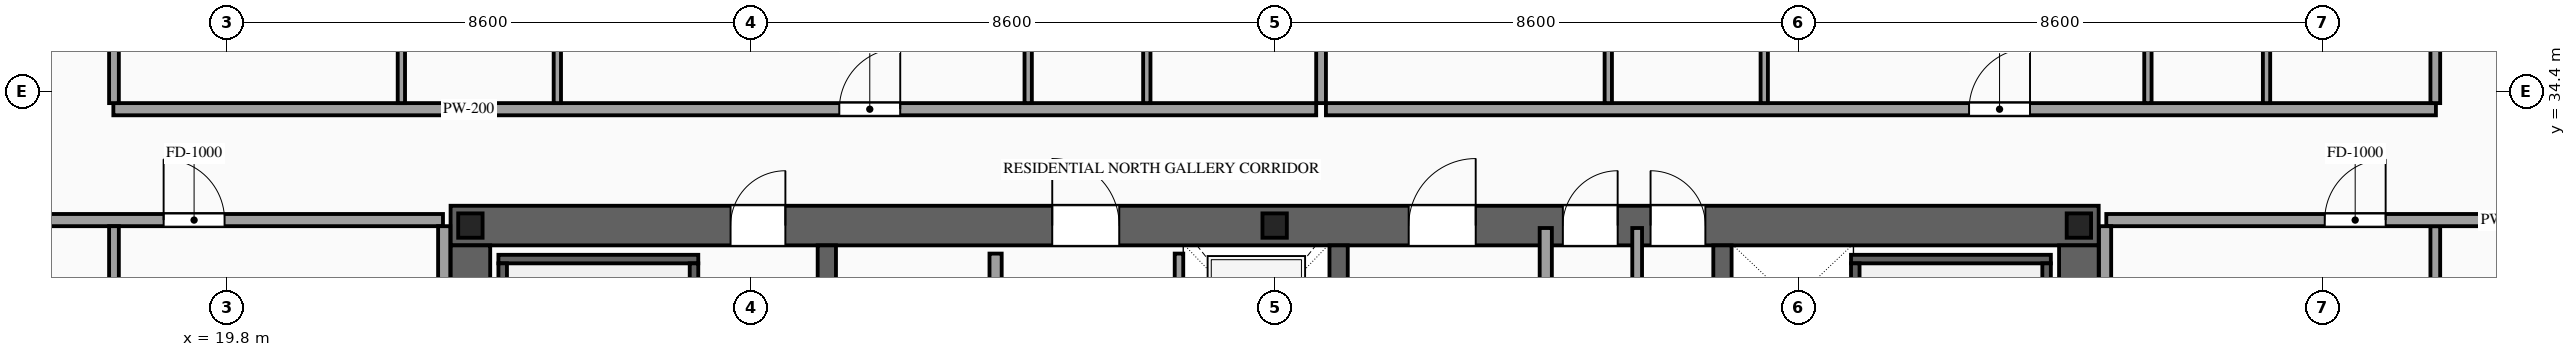
"""IFC4 building model, lengths in metres.
Left out: names, types, materials, properties, quantities, classifications, styles, units other than length and angle.
Written with IfcOpenShell. Run it as: python <this file> out.ifc"""

import sys

from ifc_helpers import new_model, si_unit, direction, frame, frame_2d, origin, origin_2d, place, context, subcontext, project, spatial, rectangle, i_section, extrude, source, transform, mapped, element, fill, save


model = new_model("IFC4")
c1 = context("Model", 3, precision=1e-05, world=origin(), true_north=direction((0.0, 1.0)))
c2 = subcontext(c1, "Body", "Model", "MODEL_VIEW")
j1 = project(units=[si_unit("LENGTHUNIT", "METRE"), si_unit("PLANEANGLEUNIT", "RADIAN")], contexts=[c1])
p1 = place(None, origin())
s1 = spatial("IfcSite", under=j1, at=p1, CompositionType="ELEMENT")
p2 = place(p1, origin())
s2 = spatial("IfcBuilding", under=s1, at=p2, CompositionType="ELEMENT")
p3 = place(p2, frame((0.0, 0.0, 198.5)))
s3 = spatial("IfcBuildingStorey", under=s2, at=p3, CompositionType="ELEMENT", Elevation=198.5)
p4 = place(p3, frame((23.475, 32.2, 0.0), z_axis=(0.0, 0.0, 1.0), x_axis=(1.0, 0.0, 0.0)))
e1 = element("IfcWall", 1, at=p4, inside=s3, PredefinedType="SHEAR", context=c2, shape_type="SweptSolid", body=[
    extrude(rectangle(XDim=27.05, YDim=0.65, at=frame_2d((13.525, 0.0))), origin(), (0.0, 0.0, 1.0), 3.5),
])
p5 = place(p4, frame((4.595, 0.0, 0.0)))
e2 = element("IfcOpeningElement", 2, at=p5, cuts=e1, PredefinedType="OPENING", context=c2, shape_type="SweptSolid", body=[
    extrude(rectangle(XDim=0.9, YDim=2.15, at=frame_2d((0.45, 1.075))), frame((0.0, 0.34, 0.0), z_axis=(0.0, -1.0, 0.0), x_axis=(1.0, 0.0, 0.0)), (0.0, 0.0, 1.0), 0.68),
])
p6 = place(p4, frame((9.875, 0.0, 0.0)))
e3 = element("IfcOpeningElement", 3, at=p6, cuts=e1, PredefinedType="OPENING", context=c2, shape_type="SweptSolid", body=[
    extrude(rectangle(XDim=1.1, YDim=2.2, at=frame_2d((0.55, 1.1))), frame((0.0, 0.34, 0.0), z_axis=(0.0, -1.0, 0.0), x_axis=(1.0, 0.0, 0.0)), (0.0, 0.0, 1.0), 0.68),
])
p7 = place(p4, frame((15.725, 0.0, 0.0)))
e4 = element("IfcOpeningElement", 4, at=p7, cuts=e1, PredefinedType="OPENING", context=c2, shape_type="SweptSolid", body=[
    extrude(rectangle(XDim=1.1, YDim=2.2, at=frame_2d((0.55, 1.1))), frame((0.0, 0.34, 0.0), z_axis=(0.0, -1.0, 0.0), x_axis=(1.0, 0.0, 0.0)), (0.0, 0.0, 1.0), 0.68),
])
p8 = place(p4, frame((18.255, 0.0, 0.0)))
e5 = element("IfcOpeningElement", 5, at=p8, cuts=e1, PredefinedType="OPENING", context=c2, shape_type="SweptSolid", body=[
    extrude(rectangle(XDim=0.9, YDim=2.15, at=frame_2d((0.45, 1.075))), frame((0.0, 0.34, 0.0), z_axis=(0.0, -1.0, 0.0), x_axis=(1.0, 0.0, 0.0)), (0.0, 0.0, 1.0), 0.68),
])
p9 = place(p4, frame((19.695, 0.0, 0.0)))
e6 = element("IfcOpeningElement", 6, at=p9, cuts=e1, PredefinedType="OPENING", context=c2, shape_type="SweptSolid", body=[
    extrude(rectangle(XDim=0.9, YDim=2.15, at=frame_2d((0.45, 1.075))), frame((0.0, 0.34, 0.0), z_axis=(0.0, -1.0, 0.0), x_axis=(1.0, 0.0, 0.0)), (0.0, 0.0, 1.0), 0.68),
])
m1 = source(origin(), c2, "Body", "SweptSolid", [
    extrude(rectangle(XDim=12.15, YDim=0.65, at=frame_2d((6.075, 0.0))), origin(), (0.0, 0.0, 1.0), 3.5),
])
for number, where, z_axis, x_axis in (
    (7, (23.8, 19.725, 0.0), (0.0, 0.0, 1.0), (0.0, 1.0, 0.0)),
    (8, (50.2, 19.725, 0.0), (0.0, 0.0, 1.0), (0.0, 1.0, 0.0)),
):
    element("IfcWall", number, at=place(p3, frame(where, z_axis=z_axis, x_axis=x_axis)), inside=s3, PredefinedType="SHEAR", context=c2, shape_type="MappedRepresentation", body=[
        mapped(m1, transform((0.0, 0.0, 0.0), scale=1.0)),
    ])
m2 = source(origin(), c2, "Body", "SweptSolid", [
    extrude(rectangle(XDim=12.15, YDim=0.3, at=frame_2d((6.075, 0.0))), origin(), (0.0, 0.0, 1.0), 3.5),
])
for number, where, z_axis, x_axis in (
    (9, (29.65, 19.725, 0.0), (0.0, 0.0, 1.0), (0.0, 1.0, 0.0)),
    (10, (38.05, 19.725, 0.0), (0.0, 0.0, 1.0), (0.0, 1.0, 0.0)),
    (11, (44.35, 19.725, 0.0), (0.0, 0.0, 1.0), (0.0, 1.0, 0.0)),
):
    element("IfcWall", number, at=place(p3, frame(where, z_axis=z_axis, x_axis=x_axis)), inside=s3, PredefinedType="SOLIDWALL", context=c2, shape_type="MappedRepresentation", body=[
        mapped(m2, transform((0.0, 0.0, 0.0), scale=1.0)),
    ])
m3 = source(origin(), c2, "Body", "SweptSolid", [
    extrude(i_section(OverallWidth=0.4, OverallDepth=0.4, WebThickness=0.013, FlangeThickness=0.021, at=origin_2d()), origin(), (0.0, 0.0, 1.0), 3.5),
])
for number, where, z_axis, x_axis in (
    (12, (23.8, 32.2, 0.0), (0.0, 0.0, 1.0), (1.0, 0.0, 0.0)),
    (13, (37.0, 32.2, 0.0), (0.0, 0.0, 1.0), (1.0, 0.0, 0.0)),
    (14, (50.2, 32.2, 0.0), (0.0, 0.0, 1.0), (1.0, 0.0, 0.0)),
):
    element("IfcColumn", number, at=place(p3, frame(where, z_axis=z_axis, x_axis=x_axis)), inside=s3, PredefinedType="COLUMN", context=c2, shape_type="MappedRepresentation", body=[
        mapped(m3, transform((0.0, 0.0, 0.0), scale=1.0)),
    ])
p10 = place(p3, frame((35.43, 29.4, 0.0), z_axis=(0.0, 0.0, 1.0), x_axis=(0.0, 1.0, 0.0)))
e15 = element("IfcWall", 15, at=p10, inside=s3, PredefinedType="SOLIDWALL", context=c2, shape_type="SweptSolid", body=[
    extrude(rectangle(XDim=2.34, YDim=0.14, at=frame_2d((1.17, 0.0))), origin(), (0.0, 0.0, 1.0), 3.28),
])
p11 = place(p10, frame((0.62, 0.0, 0.0)))
e16 = element("IfcOpeningElement", 16, at=p11, cuts=e15, PredefinedType="OPENING", context=c2, shape_type="SweptSolid", body=[
    extrude(rectangle(XDim=1.1, YDim=2.2, at=frame_2d((0.55, 1.1))), frame((0.0, 0.085, 0.0), z_axis=(0.0, -1.0, 0.0), x_axis=(1.0, 0.0, 0.0)), (0.0, 0.0, 1.0), 0.17),
])
m4 = source(origin(), c2, "Body", "SweptSolid", [
    extrude(rectangle(XDim=3.28, YDim=0.14, at=frame_2d((1.64, 0.0))), origin(), (0.0, 0.0, 1.0), 3.28),
])
p12 = place(p3, frame((24.26, 31.65, 0.0), z_axis=(0.0, 0.0, 1.0), x_axis=(1.0, 0.0, 0.0)))
e17 = element("IfcWall", 17, at=p12, inside=s3, PredefinedType="SOLIDWALL", context=c2, shape_type="MappedRepresentation", body=[
    mapped(m4, transform((0.0, 0.0, 0.0), scale=1.0)),
])
m5 = source(origin(), c2, "Body", "SweptSolid", [
    extrude(rectangle(XDim=8.94, YDim=0.14, at=frame_2d((4.47, 0.0))), origin(), (0.0, 0.0, 1.0), 3.28),
])
for number, where, z_axis, x_axis in (
    (18, (24.33, 22.64, 0.0), (0.0, 0.0, 1.0), (0.0, 1.0, 0.0)),
    (19, (27.47, 22.64, 0.0), (0.0, 0.0, 1.0), (0.0, 1.0, 0.0)),
):
    element("IfcWall", number, at=place(p3, frame(where, z_axis=z_axis, x_axis=x_axis)), inside=s3, PredefinedType="SOLIDWALL", context=c2, shape_type="MappedRepresentation", body=[
        mapped(m5, transform((0.0, 0.0, 0.0), scale=1.0)),
    ])
p13 = place(p3, frame((46.46, 31.65, 0.0), z_axis=(0.0, 0.0, 1.0), x_axis=(1.0, 0.0, 0.0)))
e20 = element("IfcWall", 20, at=p13, inside=s3, PredefinedType="SOLIDWALL", context=c2, shape_type="MappedRepresentation", body=[
    mapped(m4, transform((0.0, 0.0, 0.0), scale=1.0)),
])
for number, where, z_axis, x_axis in (
    (21, (46.53, 22.64, 0.0), (0.0, 0.0, 1.0), (0.0, 1.0, 0.0)),
    (22, (49.67, 22.64, 0.0), (0.0, 0.0, 1.0), (0.0, 1.0, 0.0)),
):
    element("IfcWall", number, at=place(p3, frame(where, z_axis=z_axis, x_axis=x_axis)), inside=s3, PredefinedType="SOLIDWALL", context=c2, shape_type="MappedRepresentation", body=[
        mapped(m5, transform((0.0, 0.0, 0.0), scale=1.0)),
    ])
p14 = place(p3, frame((32.42, 28.05, 0.0), z_axis=(0.0, 0.0, 1.0), x_axis=(0.0, 1.0, 0.0)))
e23 = element("IfcWall", 23, at=p14, inside=s3, PredefinedType="PARTITIONING", context=c2, shape_type="SweptSolid", body=[
    extrude(rectangle(XDim=3.69, YDim=0.2, at=frame_2d((1.845, 0.0))), origin(), (0.0, 0.0, 1.0), 3.28),
])
p15 = place(p14, frame((1.395, 0.0, 0.0)))
e24 = element("IfcOpeningElement", 24, at=p15, cuts=e23, PredefinedType="OPENING", context=c2, shape_type="SweptSolid", body=[
    extrude(rectangle(XDim=0.9, YDim=2.15, at=frame_2d((0.45, 1.075))), frame((0.0, 0.115, 0.0), z_axis=(0.0, -1.0, 0.0), x_axis=(1.0, 0.0, 0.0)), (0.0, 0.0, 1.0), 0.23),
])
m6 = source(origin(), c2, "Body", "SweptSolid", [
    extrude(rectangle(XDim=5.96, YDim=0.2, at=frame_2d((2.98, 0.0))), origin(), (0.0, 0.0, 1.0), 3.28),
])
p16 = place(p3, frame((41.45, 26.2, 0.0), z_axis=(0.0, 0.0, 1.0), x_axis=(0.0, 1.0, 0.0)))
e25 = element("IfcWall", 25, at=p16, inside=s3, PredefinedType="PARTITIONING", context=c2, shape_type="MappedRepresentation", body=[
    mapped(m6, transform((0.0, 0.0, 0.0), scale=1.0)),
])
m7 = source(origin(), c2, "Body", "SweptSolid", [
    extrude(rectangle(XDim=5.96, YDim=0.16, at=frame_2d((2.98, 0.0))), origin(), (0.0, 0.0, 1.0), 3.28),
])
p17 = place(p3, frame((42.95, 26.2, 0.0), z_axis=(0.0, 0.0, 1.0), x_axis=(0.0, 1.0, 0.0)))
e26 = element("IfcWall", 26, at=p17, inside=s3, PredefinedType="PARTITIONING", context=c2, shape_type="MappedRepresentation", body=[
    mapped(m7, transform((0.0, 0.0, 0.0), scale=1.0)),
])
p18 = place(p3, frame((17.94, 34.11, 0.0), z_axis=(0.0, 0.0, 1.0), x_axis=(1.0, 0.0, 0.0)))
e27 = element("IfcWall", 27, at=p18, inside=s3, PredefinedType="PARTITIONING", context=c2, shape_type="SweptSolid", body=[
    extrude(rectangle(XDim=19.742, YDim=0.2, at=frame_2d((9.871, 0.0))), origin(), (0.0, 0.0, 1.0), 3.28),
])
p19 = place(p18, frame((11.915, 0.0, 0.0)))
e28 = element("IfcOpeningElement", 28, at=p19, cuts=e27, PredefinedType="OPENING", context=c2, shape_type="SweptSolid", body=[
    extrude(rectangle(XDim=1.0, YDim=2.2, at=frame_2d((0.5, 1.1))), frame((0.0, 0.115, 0.0), z_axis=(0.0, -1.0, 0.0), x_axis=(1.0, 0.0, 0.0)), (0.0, 0.0, 1.0), 0.23),
])
m8 = source(origin(), c2, "Body", "SweptSolid", [
    extrude(rectangle(XDim=13.54, YDim=0.16, at=frame_2d((6.77, 0.0))), origin(), (0.0, 0.0, 1.0), 3.28),
])
p20 = place(p3, frame((37.762, 34.21, 0.0), z_axis=(0.0, 0.0, 1.0), x_axis=(0.0, 1.0, 0.0)))
e29 = element("IfcWall", 29, at=p20, inside=s3, PredefinedType="PARTITIONING", context=c2, shape_type="MappedRepresentation", body=[
    mapped(m8, transform((0.0, 0.0, 0.0), scale=1.0)),
])
m9 = source(origin(), c2, "Body", "SweptSolid", [
    extrude(rectangle(XDim=5.61, YDim=0.12, at=frame_2d((2.805, 0.0))), origin(), (0.0, 0.0, 1.0), 3.28),
])
p21 = place(p3, frame((22.667, 34.21, 0.0), z_axis=(0.0, 0.0, 1.0), x_axis=(0.0, 1.0, 0.0)))
e30 = element("IfcWall", 30, at=p21, inside=s3, PredefinedType="PARTITIONING", context=c2, shape_type="MappedRepresentation", body=[
    mapped(m9, transform((0.0, 0.0, 0.0), scale=1.0)),
])
p22 = place(p3, frame((25.227, 34.21, 0.0), z_axis=(0.0, 0.0, 1.0), x_axis=(0.0, 1.0, 0.0)))
e31 = element("IfcWall", 31, at=p22, inside=s3, PredefinedType="PARTITIONING", context=c2, shape_type="SweptSolid", body=[
    extrude(rectangle(XDim=5.61, YDim=0.12, at=frame_2d((2.805, 0.0))), origin(), (0.0, 0.0, 1.0), 3.28),
])
p23 = place(p22, frame((2.38, 0.0, 0.0)))
e32 = element("IfcOpeningElement", 32, at=p23, cuts=e31, PredefinedType="OPENING", context=c2, shape_type="SweptSolid", body=[
    extrude(rectangle(XDim=0.85, YDim=2.1, at=frame_2d((0.425, 1.05))), frame((0.0, 0.075, 0.0), z_axis=(0.0, -1.0, 0.0), x_axis=(1.0, 0.0, 0.0)), (0.0, 0.0, 1.0), 0.15),
])
for number, where, z_axis, x_axis in (
    (33, (34.902, 34.21, 0.0), (0.0, 0.0, 1.0), (0.0, 1.0, 0.0)),
    (34, (32.955, 34.21, 0.0), (0.0, 0.0, 1.0), (0.0, 1.0, 0.0)),
):
    element("IfcWall", number, at=place(p3, frame(where, z_axis=z_axis, x_axis=x_axis)), inside=s3, PredefinedType="PARTITIONING", context=c2, shape_type="MappedRepresentation", body=[
        mapped(m9, transform((0.0, 0.0, 0.0), scale=1.0)),
    ])
p24 = place(p3, frame((37.842, 34.11, 0.0), z_axis=(0.0, 0.0, 1.0), x_axis=(1.0, 0.0, 0.0)))
e35 = element("IfcWall", 35, at=p24, inside=s3, PredefinedType="PARTITIONING", context=c2, shape_type="SweptSolid", body=[
    extrude(rectangle(XDim=18.218, YDim=0.2, at=frame_2d((9.109, 0.0))), origin(), (0.0, 0.0, 1.0), 3.28),
])
p25 = place(p24, frame((10.556, 0.0, 0.0)))
e36 = element("IfcOpeningElement", 36, at=p25, cuts=e35, PredefinedType="OPENING", context=c2, shape_type="SweptSolid", body=[
    extrude(rectangle(XDim=1.0, YDim=2.2, at=frame_2d((0.5, 1.1))), frame((0.0, 0.115, 0.0), z_axis=(0.0, -1.0, 0.0), x_axis=(1.0, 0.0, 0.0)), (0.0, 0.0, 1.0), 0.23),
])
m10 = source(origin(), c2, "Body", "SweptSolid", [
    extrude(rectangle(XDim=13.39, YDim=0.16, at=frame_2d((6.695, 0.0))), origin(), (0.0, 0.0, 1.0), 3.28),
])
for number, where, z_axis, x_axis in (
    (37, (17.95, 34.21, 0.0), (0.0, 0.0, 1.0), (0.0, 1.0, 0.0)),
    (38, (56.05, 34.21, 0.0), (0.0, 0.0, 1.0), (0.0, 1.0, 0.0)),
):
    element("IfcWall", number, at=place(p3, frame(where, z_axis=z_axis, x_axis=x_axis)), inside=s3, PredefinedType="PARTITIONING", context=c2, shape_type="MappedRepresentation", body=[
        mapped(m10, transform((0.0, 0.0, 0.0), scale=1.0)),
    ])
p26 = place(p3, frame((42.476, 34.21, 0.0), z_axis=(0.0, 0.0, 1.0), x_axis=(0.0, 1.0, 0.0)))
e39 = element("IfcWall", 39, at=p26, inside=s3, PredefinedType="PARTITIONING", context=c2, shape_type="MappedRepresentation", body=[
    mapped(m9, transform((0.0, 0.0, 0.0), scale=1.0)),
])
p27 = place(p3, frame((45.036, 34.21, 0.0), z_axis=(0.0, 0.0, 1.0), x_axis=(0.0, 1.0, 0.0)))
e40 = element("IfcWall", 40, at=p27, inside=s3, PredefinedType="PARTITIONING", context=c2, shape_type="SweptSolid", body=[
    extrude(rectangle(XDim=5.61, YDim=0.12, at=frame_2d((2.805, 0.0))), origin(), (0.0, 0.0, 1.0), 3.28),
])
p28 = place(p27, frame((2.38, 0.0, 0.0)))
e41 = element("IfcOpeningElement", 41, at=p28, cuts=e40, PredefinedType="OPENING", context=c2, shape_type="SweptSolid", body=[
    extrude(rectangle(XDim=0.85, YDim=2.1, at=frame_2d((0.425, 1.05))), frame((0.0, 0.075, 0.0), z_axis=(0.0, -1.0, 0.0), x_axis=(1.0, 0.0, 0.0)), (0.0, 0.0, 1.0), 0.15),
])
for number, where, z_axis, x_axis in (
    (42, (53.28, 34.21, 0.0), (0.0, 0.0, 1.0), (0.0, 1.0, 0.0)),
    (43, (51.333, 34.21, 0.0), (0.0, 0.0, 1.0), (0.0, 1.0, 0.0)),
):
    element("IfcWall", number, at=place(p3, frame(where, z_axis=z_axis, x_axis=x_axis)), inside=s3, PredefinedType="PARTITIONING", context=c2, shape_type="MappedRepresentation", body=[
        mapped(m9, transform((0.0, 0.0, 0.0), scale=1.0)),
    ])
p29 = place(p3, frame((15.05, 32.29, 0.0), z_axis=(0.0, 0.0, 1.0), x_axis=(1.0, 0.0, 0.0)))
e44 = element("IfcWall", 44, at=p29, inside=s3, PredefinedType="PARTITIONING", context=c2, shape_type="SweptSolid", body=[
    extrude(rectangle(XDim=8.3, YDim=0.2, at=frame_2d((4.15, 0.0))), origin(), (0.0, 0.0, 1.0), 2.775),
])
p30 = place(p29, frame((3.715, 0.0, 0.0)))
e45 = element("IfcOpeningElement", 45, at=p30, cuts=e44, PredefinedType="OPENING", context=c2, shape_type="SweptSolid", body=[
    extrude(rectangle(XDim=1.0, YDim=2.2, at=frame_2d((0.5, 1.1))), frame((0.0, 0.115, 0.0), z_axis=(0.0, -1.0, 0.0), x_axis=(1.0, 0.0, 0.0)), (0.0, 0.0, 1.0), 0.23),
])
m11 = source(origin(), c2, "Body", "SweptSolid", [
    extrude(rectangle(XDim=28.19, YDim=0.16, at=frame_2d((14.095, 0.0))), origin(), (0.0, 0.0, 1.0), 3.28),
])
for number, where, z_axis, x_axis in (
    (46, (17.95, 4.0, 0.0), (0.0, 0.0, 1.0), (0.0, 1.0, 0.0)),
    (47, (56.05, 4.0, 0.0), (0.0, 0.0, 1.0), (0.0, 1.0, 0.0)),
):
    element("IfcWall", number, at=place(p3, frame(where, z_axis=z_axis, x_axis=x_axis)), inside=s3, PredefinedType="PARTITIONING", context=c2, shape_type="MappedRepresentation", body=[
        mapped(m11, transform((0.0, 0.0, 0.0), scale=1.0)),
    ])
m12 = source(origin(), c2, "Body", "SweptSolid", [
    extrude(rectangle(XDim=6.29, YDim=0.2, at=frame_2d((3.145, 0.0))), origin(), (0.0, 0.0, 1.0), 3.28),
])
p31 = place(p3, frame((23.37, 25.9, 0.0), z_axis=(0.0, 0.0, 1.0), x_axis=(0.0, 1.0, 0.0)))
e48 = element("IfcWall", 48, at=p31, inside=s3, PredefinedType="PARTITIONING", context=c2, shape_type="MappedRepresentation", body=[
    mapped(m12, transform((0.0, 0.0, 0.0), scale=1.0)),
])
p32 = place(p3, frame((50.65, 32.29, 0.0), z_axis=(0.0, 0.0, 1.0), x_axis=(1.0, 0.0, 0.0)))
e49 = element("IfcWall", 49, at=p32, inside=s3, PredefinedType="PARTITIONING", context=c2, shape_type="SweptSolid", body=[
    extrude(rectangle(XDim=8.3, YDim=0.2, at=frame_2d((4.15, 0.0))), origin(), (0.0, 0.0, 1.0), 2.775),
])
p33 = place(p32, frame((3.585, 0.0, 0.0)))
e50 = element("IfcOpeningElement", 50, at=p33, cuts=e49, PredefinedType="OPENING", context=c2, shape_type="SweptSolid", body=[
    extrude(rectangle(XDim=1.0, YDim=2.2, at=frame_2d((0.5, 1.1))), frame((0.0, 0.115, 0.0), z_axis=(0.0, -1.0, 0.0), x_axis=(1.0, 0.0, 0.0)), (0.0, 0.0, 1.0), 0.23),
])
m13 = source(origin(), c2, "Body", "SweptSolid", [
    extrude(rectangle(XDim=12.78, YDim=0.2, at=frame_2d((6.39, 0.0))), origin(), (0.0, 0.0, 1.0), 3.28),
])
p34 = place(p3, frame((50.63, 19.41, 0.0), z_axis=(0.0, 0.0, 1.0), x_axis=(0.0, 1.0, 0.0)))
e51 = element("IfcWall", 51, at=p34, inside=s3, PredefinedType="PARTITIONING", context=c2, shape_type="MappedRepresentation", body=[
    mapped(m13, transform((0.0, 0.0, 0.0), scale=1.0)),
])
m14 = source(origin(), c2, "Body", "SweptSolid", [
    extrude(rectangle(XDim=0.9, YDim=2.15, at=frame_2d((0.45, 1.075))), frame((0.0, 0.025, 0.0), z_axis=(0.0, -1.0, 0.0), x_axis=(1.0, 0.0, 0.0)), (0.0, 0.0, 1.0), 0.05),
])
p35 = place(p5, origin())
e52 = element("IfcDoor", 52, at=p35, inside=s3, OperationType="SINGLE_SWING_RIGHT", PredefinedType="DOOR", context=c2, shape_type="MappedRepresentation", body=[
    mapped(m14, transform((0.0, 0.0, 0.0), scale=1.0)),
])
fill(e2, e52)
m15 = source(origin(), c2, "Body", "SweptSolid", [
    extrude(rectangle(XDim=1.1, YDim=2.2, at=frame_2d((0.55, 1.1))), frame((0.0, 0.025, 0.0), z_axis=(0.0, -1.0, 0.0), x_axis=(1.0, 0.0, 0.0)), (0.0, 0.0, 1.0), 0.05),
])
p36 = place(p6, origin())
e53 = element("IfcDoor", 53, at=p36, inside=s3, OperationType="SINGLE_SWING_LEFT", PredefinedType="DOOR", context=c2, shape_type="MappedRepresentation", body=[
    mapped(m15, transform((0.0, 0.0, 0.0), scale=1.0)),
])
fill(e3, e53)
p37 = place(p7, origin())
e54 = element("IfcDoor", 54, at=p37, inside=s3, OperationType="SINGLE_SWING_RIGHT", PredefinedType="DOOR", context=c2, shape_type="MappedRepresentation", body=[
    mapped(m15, transform((0.0, 0.0, 0.0), scale=1.0)),
])
fill(e4, e54)
p38 = place(p8, origin())
e55 = element("IfcDoor", 55, at=p38, inside=s3, OperationType="SINGLE_SWING_RIGHT", PredefinedType="DOOR", context=c2, shape_type="MappedRepresentation", body=[
    mapped(m14, transform((0.0, 0.0, 0.0), scale=1.0)),
])
fill(e5, e55)
p39 = place(p9, origin())
e56 = element("IfcDoor", 56, at=p39, inside=s3, OperationType="SINGLE_SWING_LEFT", PredefinedType="DOOR", context=c2, shape_type="MappedRepresentation", body=[
    mapped(m14, transform((0.0, 0.0, 0.0), scale=1.0)),
])
fill(e6, e56)
m16 = source(origin(), c2, "Body", "SweptSolid", [
    extrude(rectangle(XDim=1.0, YDim=2.2, at=frame_2d((0.5, 1.1))), frame((0.0, 0.025, 0.0), z_axis=(0.0, -1.0, 0.0), x_axis=(1.0, 0.0, 0.0)), (0.0, 0.0, 1.0), 0.05),
])
p40 = place(p19, origin())
e57 = element("IfcDoor", 57, at=p40, inside=s3, OperationType="SINGLE_SWING_RIGHT", PredefinedType="DOOR", context=c2, shape_type="MappedRepresentation", body=[
    mapped(m16, transform((0.0, 0.0, 0.0), scale=1.0)),
])
fill(e28, e57)
p41 = place(p25, origin())
e58 = element("IfcDoor", 58, at=p41, inside=s3, OperationType="SINGLE_SWING_RIGHT", PredefinedType="DOOR", context=c2, shape_type="MappedRepresentation", body=[
    mapped(m16, transform((0.0, 0.0, 0.0), scale=1.0)),
])
fill(e36, e58)
p42 = place(p30, origin())
e59 = element("IfcDoor", 59, at=p42, inside=s3, OperationType="SINGLE_SWING_LEFT", PredefinedType="DOOR", context=c2, shape_type="MappedRepresentation", body=[
    mapped(m16, transform((0.0, 0.0, 0.0), scale=1.0)),
])
fill(e45, e59)
p43 = place(p33, origin())
e60 = element("IfcDoor", 60, at=p43, inside=s3, OperationType="SINGLE_SWING_RIGHT", PredefinedType="DOOR", context=c2, shape_type="MappedRepresentation", body=[
    mapped(m16, transform((0.0, 0.0, 0.0), scale=1.0)),
])
fill(e50, e60)
save(model, sys.argv[1])
